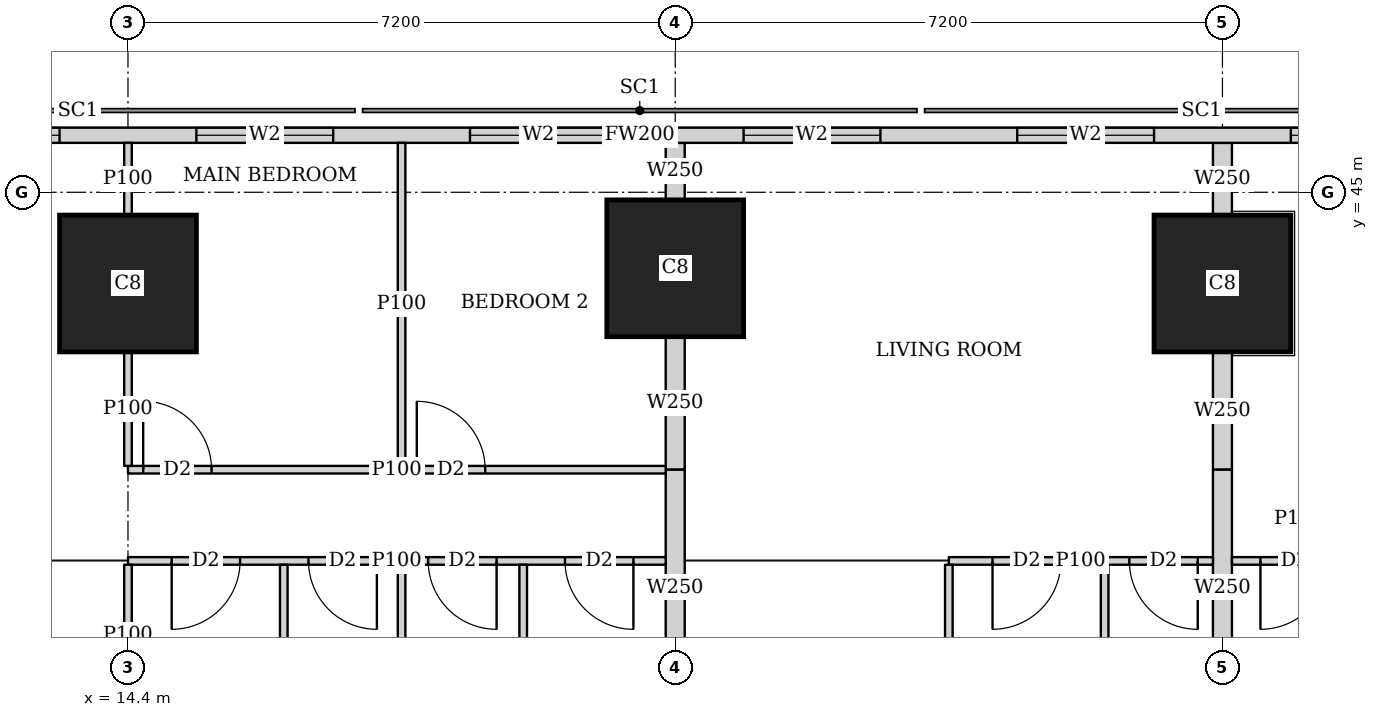
"""IFC4 building model, lengths in metres.
Left out: names, types, materials, properties, quantities, classifications, styles, units other than length and angle.
Written with IfcOpenShell. Run it as: python <this file> out.ifc"""

import sys

from ifc_helpers import new_model, si_unit, direction, frame, frame_2d, origin, origin_2d, place, context, subcontext, project, spatial, rectangle, extrude, element, fill, save


model = new_model("IFC4")
c1 = context("Model", 3, precision=1e-05, world=origin(), true_north=direction((0.0, 1.0)))
c2 = subcontext(c1, "Body", "Model", "MODEL_VIEW")
j1 = project(units=[si_unit("LENGTHUNIT", "METRE"), si_unit("PLANEANGLEUNIT", "RADIAN")], contexts=[c1])
p1 = place(None, origin())
s1 = spatial("IfcSite", under=j1, at=p1, CompositionType="ELEMENT")
p2 = place(p1, origin())
s2 = spatial("IfcBuilding", under=s1, at=p2, CompositionType="ELEMENT")
p3 = place(p2, frame((0.0, 0.0, 184.55)))
s3 = spatial("IfcBuildingStorey", under=s2, at=p3, CompositionType="ELEMENT", Elevation=184.55)
for number, where, z_axis, x_axis in (
    (1, (14.4, 43.8, 0.0), (0.0, 0.0, 1.0), (1.0, 0.0, 0.0)),
    (2, (21.6, 44.0, 0.0), (0.0, 0.0, 1.0), (1.0, 0.0, 0.0)),
    (3, (28.8, 43.8, 0.0), (0.0, 0.0, 1.0), (1.0, 0.0, 0.0)),
):
    element("IfcColumn", number, at=place(p3, frame(where, z_axis=z_axis, x_axis=x_axis)), inside=s3, PredefinedType="COLUMN", context=c2, shape_type="SweptSolid", body=[
        extrude(rectangle(XDim=1.8, YDim=1.8, at=origin_2d()), origin(), (0.0, 0.0, 1.0), 3.75),
    ])
p4 = place(p3, frame((40.106, 45.75, 0.0), z_axis=(0.0, 0.0, 1.0), x_axis=(-1.0, 0.0, 0.0)))
e4 = element("IfcWall", 4, at=p4, inside=s3, PredefinedType="SOLIDWALL", context=c2, shape_type="SweptSolid", body=[
    extrude(rectangle(XDim=37.943, YDim=0.2, at=frame_2d((18.971, 0.0))), origin(), (0.0, 0.0, 1.0), 3.45),
])
p5 = place(p4, frame((8.606, 0.0, 0.9)))
e5 = element("IfcOpeningElement", 5, at=p5, cuts=e4, PredefinedType="OPENING", context=c2, shape_type="SweptSolid", body=[
    extrude(rectangle(XDim=1.8, YDim=1.5, at=frame_2d((0.9, 0.75))), frame((0.0, 0.11, 0.0), z_axis=(0.0, -1.0, 0.0), x_axis=(1.0, 0.0, 0.0)), (0.0, 0.0, 1.0), 0.22),
])
p6 = place(p4, frame((12.206, 0.0, 0.9)))
e6 = element("IfcOpeningElement", 6, at=p6, cuts=e4, PredefinedType="OPENING", context=c2, shape_type="SweptSolid", body=[
    extrude(rectangle(XDim=1.8, YDim=1.5, at=frame_2d((0.9, 0.75))), frame((0.0, 0.11, 0.0), z_axis=(0.0, -1.0, 0.0), x_axis=(1.0, 0.0, 0.0)), (0.0, 0.0, 1.0), 0.22),
])
p7 = place(p4, frame((15.806, 0.0, 0.9)))
e7 = element("IfcOpeningElement", 7, at=p7, cuts=e4, PredefinedType="OPENING", context=c2, shape_type="SweptSolid", body=[
    extrude(rectangle(XDim=1.8, YDim=1.5, at=frame_2d((0.9, 0.75))), frame((0.0, 0.11, 0.0), z_axis=(0.0, -1.0, 0.0), x_axis=(1.0, 0.0, 0.0)), (0.0, 0.0, 1.0), 0.22),
])
p8 = place(p4, frame((19.406, 0.0, 0.9)))
e8 = element("IfcOpeningElement", 8, at=p8, cuts=e4, PredefinedType="OPENING", context=c2, shape_type="SweptSolid", body=[
    extrude(rectangle(XDim=1.8, YDim=1.5, at=frame_2d((0.9, 0.75))), frame((0.0, 0.11, 0.0), z_axis=(0.0, -1.0, 0.0), x_axis=(1.0, 0.0, 0.0)), (0.0, 0.0, 1.0), 0.22),
])
p9 = place(p4, frame((23.006, 0.0, 0.9)))
e9 = element("IfcOpeningElement", 9, at=p9, cuts=e4, PredefinedType="OPENING", context=c2, shape_type="SweptSolid", body=[
    extrude(rectangle(XDim=1.8, YDim=1.5, at=frame_2d((0.9, 0.75))), frame((0.0, 0.11, 0.0), z_axis=(0.0, -1.0, 0.0), x_axis=(1.0, 0.0, 0.0)), (0.0, 0.0, 1.0), 0.22),
])
p10 = place(p4, frame((26.606, 0.0, 0.9)))
e10 = element("IfcOpeningElement", 10, at=p10, cuts=e4, PredefinedType="OPENING", context=c2, shape_type="SweptSolid", body=[
    extrude(rectangle(XDim=1.8, YDim=1.5, at=frame_2d((0.9, 0.75))), frame((0.0, 0.11, 0.0), z_axis=(0.0, -1.0, 0.0), x_axis=(1.0, 0.0, 0.0)), (0.0, 0.0, 1.0), 0.22),
])
p11 = place(p3, frame((14.4, 41.35, 0.0), z_axis=(0.0, 0.0, 1.0), x_axis=(1.0, 0.0, 0.0)))
e11 = element("IfcWall", 11, at=p11, inside=s3, PredefinedType="PARTITIONING", context=c2, shape_type="SweptSolid", body=[
    extrude(rectangle(XDim=7.075, YDim=0.1, at=frame_2d((3.538, 0.0))), origin(), (0.0, 0.0, 1.0), 3.45),
])
p12 = place(p11, frame((0.2, 0.0, 0.0)))
e12 = element("IfcOpeningElement", 12, at=p12, cuts=e11, PredefinedType="OPENING", context=c2, shape_type="SweptSolid", body=[
    extrude(rectangle(XDim=0.9, YDim=2.1, at=frame_2d((0.45, 1.05))), frame((0.0, 0.06, 0.0), z_axis=(0.0, -1.0, 0.0), x_axis=(1.0, 0.0, 0.0)), (0.0, 0.0, 1.0), 0.12),
])
p13 = place(p11, frame((3.8, 0.0, 0.0)))
e13 = element("IfcOpeningElement", 13, at=p13, cuts=e11, PredefinedType="OPENING", context=c2, shape_type="SweptSolid", body=[
    extrude(rectangle(XDim=0.9, YDim=2.1, at=frame_2d((0.45, 1.05))), frame((0.0, 0.06, 0.0), z_axis=(0.0, -1.0, 0.0), x_axis=(1.0, 0.0, 0.0)), (0.0, 0.0, 1.0), 0.12),
])
p14 = place(p3, frame((14.4, 40.15, 0.0), z_axis=(0.0, 0.0, 1.0), x_axis=(1.0, 0.0, 0.0)))
e14 = element("IfcWall", 14, at=p14, inside=s3, PredefinedType="PARTITIONING", context=c2, shape_type="SweptSolid", body=[
    extrude(rectangle(XDim=7.075, YDim=0.1, at=frame_2d((3.538, 0.0))), origin(), (0.0, 0.0, 1.0), 3.45),
])
p15 = place(p14, frame((0.575, 0.0, 0.0)))
e15 = element("IfcOpeningElement", 15, at=p15, cuts=e14, PredefinedType="OPENING", context=c2, shape_type="SweptSolid", body=[
    extrude(rectangle(XDim=0.9, YDim=2.1, at=frame_2d((0.45, 1.05))), frame((0.0, 0.06, 0.0), z_axis=(0.0, -1.0, 0.0), x_axis=(1.0, 0.0, 0.0)), (0.0, 0.0, 1.0), 0.12),
])
p16 = place(p14, frame((3.95, 0.0, 0.0)))
e16 = element("IfcOpeningElement", 16, at=p16, cuts=e14, PredefinedType="OPENING", context=c2, shape_type="SweptSolid", body=[
    extrude(rectangle(XDim=0.9, YDim=2.1, at=frame_2d((0.45, 1.05))), frame((0.0, 0.06, 0.0), z_axis=(0.0, -1.0, 0.0), x_axis=(1.0, 0.0, 0.0)), (0.0, 0.0, 1.0), 0.12),
])
p17 = place(p14, frame((2.375, 0.0, 0.0)))
e17 = element("IfcOpeningElement", 17, at=p17, cuts=e14, PredefinedType="OPENING", context=c2, shape_type="SweptSolid", body=[
    extrude(rectangle(XDim=0.9, YDim=2.1, at=frame_2d((0.45, 1.05))), frame((0.0, 0.06, 0.0), z_axis=(0.0, -1.0, 0.0), x_axis=(1.0, 0.0, 0.0)), (0.0, 0.0, 1.0), 0.12),
])
p18 = place(p14, frame((5.75, 0.0, 0.0)))
e18 = element("IfcOpeningElement", 18, at=p18, cuts=e14, PredefinedType="OPENING", context=c2, shape_type="SweptSolid", body=[
    extrude(rectangle(XDim=0.9, YDim=2.1, at=frame_2d((0.45, 1.05))), frame((0.0, 0.06, 0.0), z_axis=(0.0, -1.0, 0.0), x_axis=(1.0, 0.0, 0.0)), (0.0, 0.0, 1.0), 0.12),
])
p19 = place(p3, frame((14.4, 41.4, 0.0), z_axis=(0.0, 0.0, 1.0), x_axis=(0.0, 1.0, 0.0)))
e19 = element("IfcWall", 19, at=p19, inside=s3, PredefinedType="PARTITIONING", context=c2, shape_type="SweptSolid", body=[
    extrude(rectangle(XDim=1.499, YDim=0.1, at=frame_2d((0.75, 0.0))), origin(), (0.0, 0.0, 1.0), 3.45),
])
p20 = place(p3, frame((14.4, 44.701, 0.0), z_axis=(0.0, 0.0, 1.0), x_axis=(0.0, 1.0, 0.0)))
e20 = element("IfcWall", 20, at=p20, inside=s3, PredefinedType="PARTITIONING", context=c2, shape_type="SweptSolid", body=[
    extrude(rectangle(XDim=0.949, YDim=0.1, at=frame_2d((0.475, 0.0))), origin(), (0.0, 0.0, 1.0), 3.45),
])
p21 = place(p3, frame((18.0, 41.4, 0.0), z_axis=(0.0, 0.0, 1.0), x_axis=(0.0, 1.0, 0.0)))
e21 = element("IfcWall", 21, at=p21, inside=s3, PredefinedType="PARTITIONING", context=c2, shape_type="SweptSolid", body=[
    extrude(rectangle(XDim=4.25, YDim=0.1, at=frame_2d((2.125, 0.0))), origin(), (0.0, 0.0, 1.0), 2.05),
])
p22 = place(p3, frame((14.4, 38.251, 0.0), z_axis=(0.0, 0.0, 1.0), x_axis=(0.0, 1.0, 0.0)))
e22 = element("IfcWall", 22, at=p22, inside=s3, PredefinedType="PARTITIONING", context=c2, shape_type="SweptSolid", body=[
    extrude(rectangle(XDim=1.849, YDim=0.1, at=frame_2d((0.925, 0.0))), origin(), (0.0, 0.0, 1.0), 3.45),
])
for number, where, z_axis, x_axis in (
    (23, (18.0, 36.575, 0.0), (0.0, 0.0, 1.0), (0.0, 1.0, 0.0)),
    (24, (16.45, 36.575, 0.0), (0.0, 0.0, 1.0), (0.0, 1.0, 0.0)),
    (25, (19.6, 36.575, 0.0), (0.0, 0.0, 1.0), (0.0, 1.0, 0.0)),
):
    element("IfcWall", number, at=place(p3, frame(where, z_axis=z_axis, x_axis=x_axis)), inside=s3, PredefinedType="PARTITIONING", context=c2, shape_type="SweptSolid", body=[
        extrude(rectangle(XDim=3.525, YDim=0.1, at=frame_2d((1.763, 0.0))), origin(), (0.0, 0.0, 1.0), 3.45),
    ])
p23 = place(p3, frame((25.2, 40.15, 0.0), z_axis=(0.0, 0.0, 1.0), x_axis=(1.0, 0.0, 0.0)))
e26 = element("IfcWall", 26, at=p23, inside=s3, PredefinedType="PARTITIONING", context=c2, shape_type="SweptSolid", body=[
    extrude(rectangle(XDim=3.475, YDim=0.1, at=frame_2d((1.738, 0.0))), origin(), (0.0, 0.0, 1.0), 3.45),
])
p24 = place(p23, frame((0.575, 0.0, 0.0)))
e27 = element("IfcOpeningElement", 27, at=p24, cuts=e26, PredefinedType="OPENING", context=c2, shape_type="SweptSolid", body=[
    extrude(rectangle(XDim=0.9, YDim=2.1, at=frame_2d((0.45, 1.05))), frame((0.0, 0.06, 0.0), z_axis=(0.0, -1.0, 0.0), x_axis=(1.0, 0.0, 0.0)), (0.0, 0.0, 1.0), 0.12),
])
p25 = place(p23, frame((2.375, 0.0, 0.0)))
e28 = element("IfcOpeningElement", 28, at=p25, cuts=e26, PredefinedType="OPENING", context=c2, shape_type="SweptSolid", body=[
    extrude(rectangle(XDim=0.9, YDim=2.1, at=frame_2d((0.45, 1.05))), frame((0.0, 0.06, 0.0), z_axis=(0.0, -1.0, 0.0), x_axis=(1.0, 0.0, 0.0)), (0.0, 0.0, 1.0), 0.12),
])
for number, where, z_axis, x_axis in (
    (29, (25.2, 36.575, 0.0), (0.0, 0.0, 1.0), (0.0, 1.0, 0.0)),
    (30, (27.25, 36.575, 0.0), (0.0, 0.0, 1.0), (0.0, 1.0, 0.0)),
):
    element("IfcWall", number, at=place(p3, frame(where, z_axis=z_axis, x_axis=x_axis)), inside=s3, PredefinedType="PARTITIONING", context=c2, shape_type="SweptSolid", body=[
        extrude(rectangle(XDim=3.525, YDim=0.1, at=frame_2d((1.763, 0.0))), origin(), (0.0, 0.0, 1.0), 3.45),
    ])
p26 = place(p3, frame((21.6, 41.35, 0.0), z_axis=(0.0, 0.0, 1.0), x_axis=(0.0, 1.0, 0.0)))
e31 = element("IfcWall", 31, at=p26, inside=s3, PredefinedType="SOLIDWALL", context=c2, shape_type="SweptSolid", body=[
    extrude(rectangle(XDim=1.749, YDim=0.25, at=frame_2d((0.875, 0.0))), origin(), (0.0, 0.0, 1.0), 2.05),
])
p27 = place(p3, frame((21.6, 44.901, 0.0), z_axis=(0.0, 0.0, 1.0), x_axis=(0.0, 1.0, 0.0)))
e32 = element("IfcWall", 32, at=p27, inside=s3, PredefinedType="SOLIDWALL", context=c2, shape_type="SweptSolid", body=[
    extrude(rectangle(XDim=0.749, YDim=0.25, at=frame_2d((0.375, 0.0))), origin(), (0.0, 0.0, 1.0), 2.05),
])
p28 = place(p3, frame((21.6, 38.251, 0.0), z_axis=(0.0, 0.0, 1.0), x_axis=(0.0, 1.0, 0.0)))
e33 = element("IfcWall", 33, at=p28, inside=s3, PredefinedType="SOLIDWALL", context=c2, shape_type="SweptSolid", body=[
    extrude(rectangle(XDim=3.099, YDim=0.25, at=frame_2d((1.55, 0.0))), origin(), (0.0, 0.0, 1.0), 3.45),
])
p29 = place(p3, frame((28.925, 40.15, 0.0), z_axis=(0.0, 0.0, 1.0), x_axis=(1.0, 0.0, 0.0)))
e34 = element("IfcWall", 34, at=p29, inside=s3, PredefinedType="PARTITIONING", context=c2, shape_type="SweptSolid", body=[
    extrude(rectangle(XDim=1.765, YDim=0.1, at=frame_2d((0.882, 0.0))), origin(), (0.0, 0.0, 1.0), 3.45),
])
p30 = place(p29, frame((0.375, 0.0, 0.0)))
e35 = element("IfcOpeningElement", 35, at=p30, cuts=e34, PredefinedType="OPENING", context=c2, shape_type="SweptSolid", body=[
    extrude(rectangle(XDim=0.9, YDim=2.1, at=frame_2d((0.45, 1.05))), frame((0.0, 0.06, 0.0), z_axis=(0.0, -1.0, 0.0), x_axis=(1.0, 0.0, 0.0)), (0.0, 0.0, 1.0), 0.12),
])
p31 = place(p3, frame((28.8, 41.35, 0.0), z_axis=(0.0, 0.0, 1.0), x_axis=(0.0, 1.0, 0.0)))
e36 = element("IfcWall", 36, at=p31, inside=s3, PredefinedType="SOLIDWALL", context=c2, shape_type="SweptSolid", body=[
    extrude(rectangle(XDim=1.549, YDim=0.25, at=frame_2d((0.774, 0.0))), origin(), (0.0, 0.0, 1.0), 2.05),
])
p32 = place(p3, frame((28.8, 44.701, 0.0), z_axis=(0.0, 0.0, 1.0), x_axis=(0.0, 1.0, 0.0)))
e37 = element("IfcWall", 37, at=p32, inside=s3, PredefinedType="SOLIDWALL", context=c2, shape_type="SweptSolid", body=[
    extrude(rectangle(XDim=0.949, YDim=0.25, at=frame_2d((0.475, 0.0))), origin(), (0.0, 0.0, 1.0), 2.05),
])
p33 = place(p3, frame((28.8, 38.251, 0.0), z_axis=(0.0, 0.0, 1.0), x_axis=(0.0, 1.0, 0.0)))
e38 = element("IfcWall", 38, at=p33, inside=s3, PredefinedType="SOLIDWALL", context=c2, shape_type="SweptSolid", body=[
    extrude(rectangle(XDim=3.099, YDim=0.25, at=frame_2d((1.55, 0.0))), origin(), (0.0, 0.0, 1.0), 3.45),
])
p34 = place(p5, origin())
e39 = element("IfcWindow", 39, at=p34, inside=s3, PartitioningType="SINGLE_PANEL", PredefinedType="WINDOW", context=c2, shape_type="SweptSolid", body=[
    extrude(rectangle(XDim=1.8, YDim=1.5, at=frame_2d((0.9, 0.75))), frame((0.0, 0.03, 0.0), z_axis=(0.0, -1.0, 0.0), x_axis=(1.0, 0.0, 0.0)), (0.0, 0.0, 1.0), 0.06),
])
fill(e5, e39)
p35 = place(p6, origin())
e40 = element("IfcWindow", 40, at=p35, inside=s3, PartitioningType="SINGLE_PANEL", PredefinedType="WINDOW", context=c2, shape_type="SweptSolid", body=[
    extrude(rectangle(XDim=1.8, YDim=1.5, at=frame_2d((0.9, 0.75))), frame((0.0, 0.03, 0.0), z_axis=(0.0, -1.0, 0.0), x_axis=(1.0, 0.0, 0.0)), (0.0, 0.0, 1.0), 0.06),
])
fill(e6, e40)
p36 = place(p7, origin())
e41 = element("IfcWindow", 41, at=p36, inside=s3, PartitioningType="SINGLE_PANEL", PredefinedType="WINDOW", context=c2, shape_type="SweptSolid", body=[
    extrude(rectangle(XDim=1.8, YDim=1.5, at=frame_2d((0.9, 0.75))), frame((0.0, 0.03, 0.0), z_axis=(0.0, -1.0, 0.0), x_axis=(1.0, 0.0, 0.0)), (0.0, 0.0, 1.0), 0.06),
])
fill(e7, e41)
p37 = place(p8, origin())
e42 = element("IfcWindow", 42, at=p37, inside=s3, PartitioningType="SINGLE_PANEL", PredefinedType="WINDOW", context=c2, shape_type="SweptSolid", body=[
    extrude(rectangle(XDim=1.8, YDim=1.5, at=frame_2d((0.9, 0.75))), frame((0.0, 0.03, 0.0), z_axis=(0.0, -1.0, 0.0), x_axis=(1.0, 0.0, 0.0)), (0.0, 0.0, 1.0), 0.06),
])
fill(e8, e42)
p38 = place(p9, origin())
e43 = element("IfcWindow", 43, at=p38, inside=s3, PartitioningType="SINGLE_PANEL", PredefinedType="WINDOW", context=c2, shape_type="SweptSolid", body=[
    extrude(rectangle(XDim=1.8, YDim=1.5, at=frame_2d((0.9, 0.75))), frame((0.0, 0.03, 0.0), z_axis=(0.0, -1.0, 0.0), x_axis=(1.0, 0.0, 0.0)), (0.0, 0.0, 1.0), 0.06),
])
fill(e9, e43)
p39 = place(p10, origin())
e44 = element("IfcWindow", 44, at=p39, inside=s3, PartitioningType="SINGLE_PANEL", PredefinedType="WINDOW", context=c2, shape_type="SweptSolid", body=[
    extrude(rectangle(XDim=1.8, YDim=1.5, at=frame_2d((0.9, 0.75))), frame((0.0, 0.03, 0.0), z_axis=(0.0, -1.0, 0.0), x_axis=(1.0, 0.0, 0.0)), (0.0, 0.0, 1.0), 0.06),
])
fill(e10, e44)
p40 = place(p12, origin())
e45 = element("IfcDoor", 45, at=p40, inside=s3, OperationType="SINGLE_SWING_LEFT", PredefinedType="DOOR", context=c2, shape_type="SweptSolid", body=[
    extrude(rectangle(XDim=0.9, YDim=2.1, at=frame_2d((0.45, 1.05))), frame((0.0, 0.025, 0.0), z_axis=(0.0, -1.0, 0.0), x_axis=(1.0, 0.0, 0.0)), (0.0, 0.0, 1.0), 0.05),
])
fill(e12, e45)
p41 = place(p13, origin())
e46 = element("IfcDoor", 46, at=p41, inside=s3, OperationType="SINGLE_SWING_LEFT", PredefinedType="DOOR", context=c2, shape_type="SweptSolid", body=[
    extrude(rectangle(XDim=0.9, YDim=2.1, at=frame_2d((0.45, 1.05))), frame((0.0, 0.025, 0.0), z_axis=(0.0, -1.0, 0.0), x_axis=(1.0, 0.0, 0.0)), (0.0, 0.0, 1.0), 0.05),
])
fill(e13, e46)
p42 = place(p15, origin())
e47 = element("IfcDoor", 47, at=p42, inside=s3, OperationType="SINGLE_SWING_RIGHT", PredefinedType="DOOR", context=c2, shape_type="SweptSolid", body=[
    extrude(rectangle(XDim=0.9, YDim=2.1, at=frame_2d((0.45, 1.05))), frame((0.0, 0.025, 0.0), z_axis=(0.0, -1.0, 0.0), x_axis=(1.0, 0.0, 0.0)), (0.0, 0.0, 1.0), 0.05),
])
fill(e15, e47)
p43 = place(p16, origin())
e48 = element("IfcDoor", 48, at=p43, inside=s3, OperationType="SINGLE_SWING_LEFT", PredefinedType="DOOR", context=c2, shape_type="SweptSolid", body=[
    extrude(rectangle(XDim=0.9, YDim=2.1, at=frame_2d((0.45, 1.05))), frame((0.0, 0.025, 0.0), z_axis=(0.0, -1.0, 0.0), x_axis=(1.0, 0.0, 0.0)), (0.0, 0.0, 1.0), 0.05),
])
fill(e16, e48)
p44 = place(p17, origin())
e49 = element("IfcDoor", 49, at=p44, inside=s3, OperationType="SINGLE_SWING_LEFT", PredefinedType="DOOR", context=c2, shape_type="SweptSolid", body=[
    extrude(rectangle(XDim=0.9, YDim=2.1, at=frame_2d((0.45, 1.05))), frame((0.0, 0.025, 0.0), z_axis=(0.0, -1.0, 0.0), x_axis=(1.0, 0.0, 0.0)), (0.0, 0.0, 1.0), 0.05),
])
fill(e17, e49)
p45 = place(p18, origin())
e50 = element("IfcDoor", 50, at=p45, inside=s3, OperationType="SINGLE_SWING_LEFT", PredefinedType="DOOR", context=c2, shape_type="SweptSolid", body=[
    extrude(rectangle(XDim=0.9, YDim=2.1, at=frame_2d((0.45, 1.05))), frame((0.0, 0.025, 0.0), z_axis=(0.0, -1.0, 0.0), x_axis=(1.0, 0.0, 0.0)), (0.0, 0.0, 1.0), 0.05),
])
fill(e18, e50)
p46 = place(p24, origin())
e51 = element("IfcDoor", 51, at=p46, inside=s3, OperationType="SINGLE_SWING_RIGHT", PredefinedType="DOOR", context=c2, shape_type="SweptSolid", body=[
    extrude(rectangle(XDim=0.9, YDim=2.1, at=frame_2d((0.45, 1.05))), frame((0.0, 0.025, 0.0), z_axis=(0.0, -1.0, 0.0), x_axis=(1.0, 0.0, 0.0)), (0.0, 0.0, 1.0), 0.05),
])
fill(e27, e51)
p47 = place(p25, origin())
e52 = element("IfcDoor", 52, at=p47, inside=s3, OperationType="SINGLE_SWING_LEFT", PredefinedType="DOOR", context=c2, shape_type="SweptSolid", body=[
    extrude(rectangle(XDim=0.9, YDim=2.1, at=frame_2d((0.45, 1.05))), frame((0.0, 0.025, 0.0), z_axis=(0.0, -1.0, 0.0), x_axis=(1.0, 0.0, 0.0)), (0.0, 0.0, 1.0), 0.05),
])
fill(e28, e52)
p48 = place(p30, origin())
e53 = element("IfcDoor", 53, at=p48, inside=s3, OperationType="SINGLE_SWING_RIGHT", PredefinedType="DOOR", context=c2, shape_type="SweptSolid", body=[
    extrude(rectangle(XDim=0.9, YDim=2.1, at=frame_2d((0.45, 1.05))), frame((0.0, 0.025, 0.0), z_axis=(0.0, -1.0, 0.0), x_axis=(1.0, 0.0, 0.0)), (0.0, 0.0, 1.0), 0.05),
])
fill(e35, e53)
save(model, sys.argv[1])
